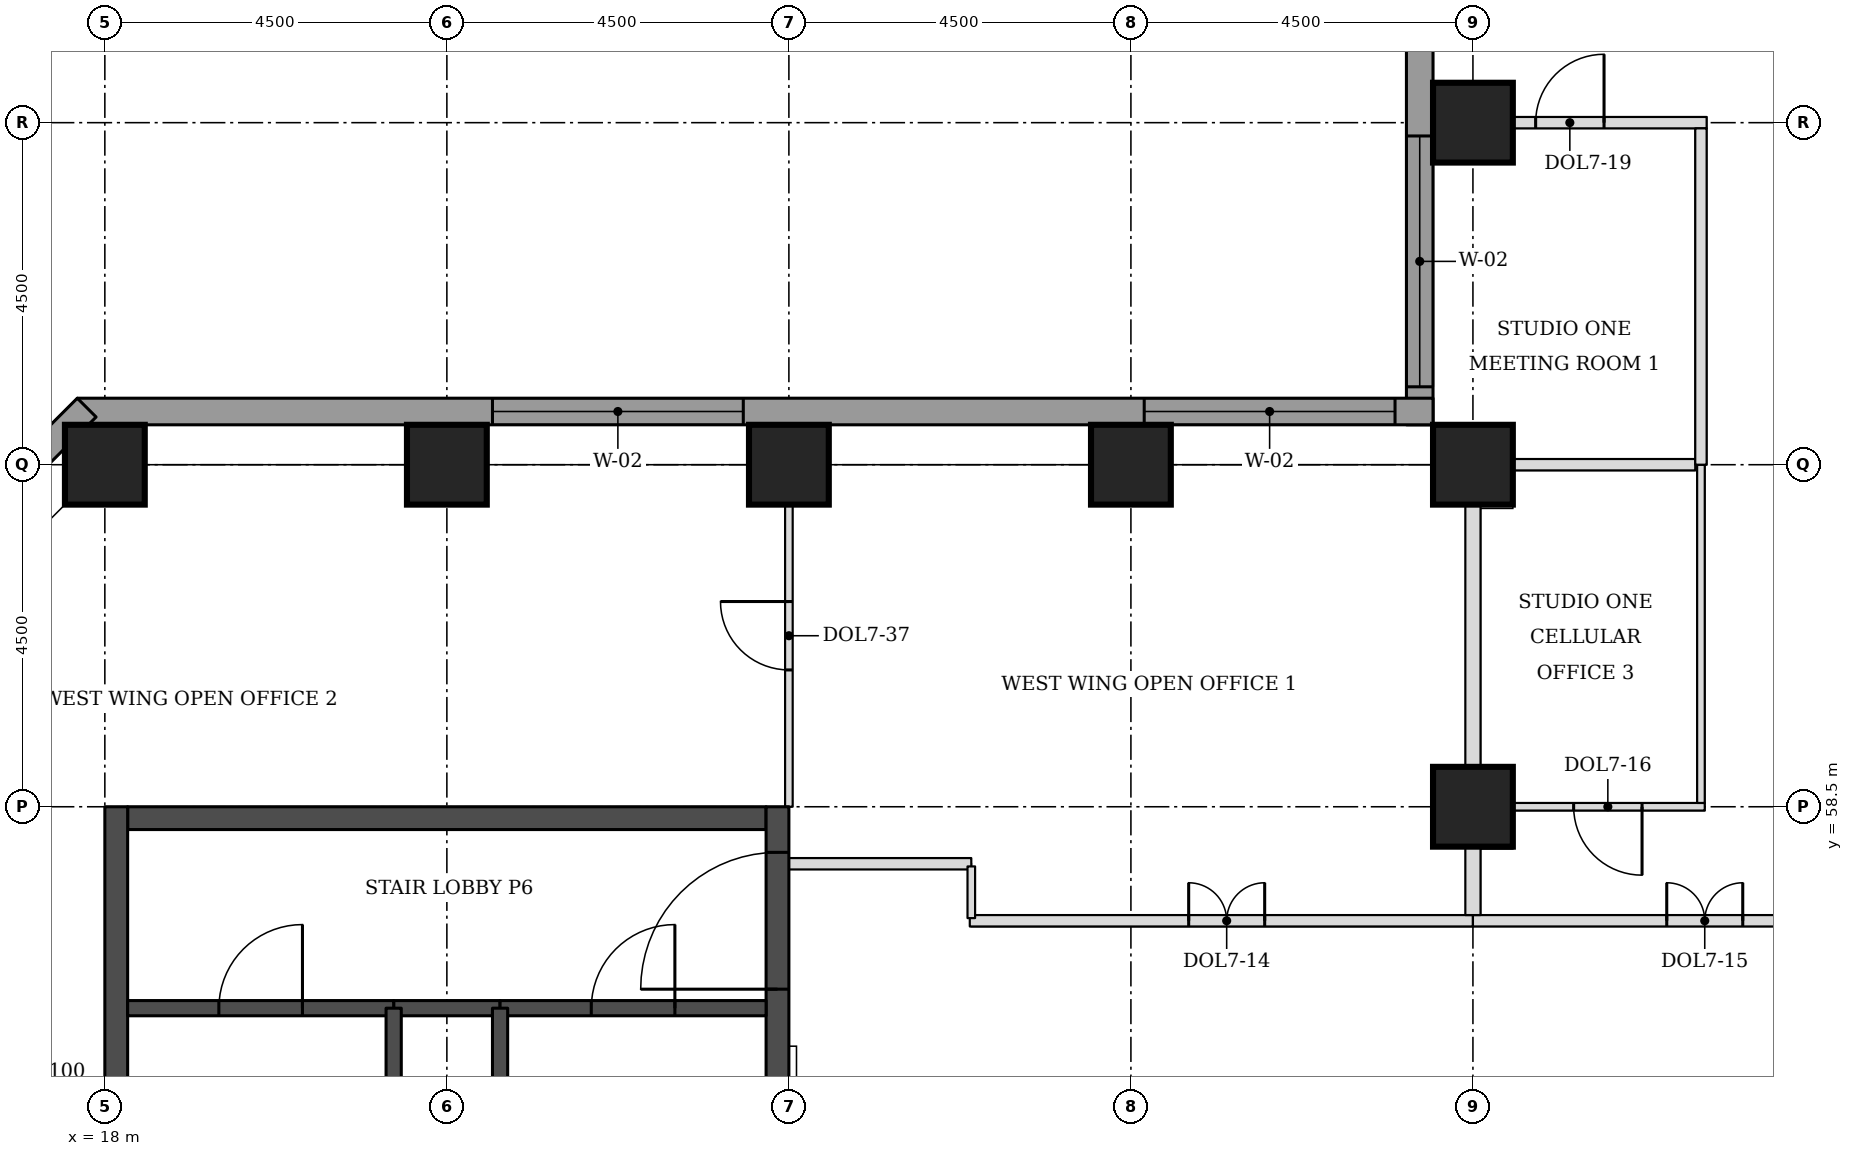
"""IFC4 building model, lengths in metres.
Left out: names, types, materials, properties, quantities, classifications, styles, units other than length and angle.
Written with IfcOpenShell. Run it as: python <this file> out.ifc"""

import sys

from ifc_helpers import new_model, si_unit, direction, frame, frame_2d, origin, origin_2d, place, context, subcontext, project, spatial, rectangle, extrude, element, fill, save


model = new_model("IFC4")
c1 = context("Model", 3, precision=1e-05, world=origin(), true_north=direction((0.0, 1.0)))
c2 = subcontext(c1, "Body", "Model", "MODEL_VIEW")
j1 = project(units=[si_unit("LENGTHUNIT", "METRE"), si_unit("PLANEANGLEUNIT", "RADIAN")], contexts=[c1])
p1 = place(None, origin())
s1 = spatial("IfcSite", under=j1, at=p1, CompositionType="ELEMENT")
p2 = place(p1, origin())
s2 = spatial("IfcBuilding", under=s1, at=p2, CompositionType="ELEMENT")
p3 = place(p2, frame((0.0, 0.0, 134.4)))
s3 = spatial("IfcBuildingStorey", under=s2, at=p3, CompositionType="ELEMENT", Elevation=134.4)
for number, where, z_axis, x_axis in (
    (1, (36.0, 58.5, 0.0), (0.0, 0.0, 1.0), (1.0, 0.0, 0.0)),
    (2, (18.0, 63.0, 0.0), (0.0, 0.0, 1.0), (1.0, 0.0, 0.0)),
    (3, (22.5, 63.0, 0.0), (0.0, 0.0, 1.0), (1.0, 0.0, 0.0)),
    (4, (27.0, 63.0, 0.0), (0.0, 0.0, 1.0), (1.0, 0.0, 0.0)),
    (5, (31.5, 63.0, 0.0), (0.0, 0.0, 1.0), (1.0, 0.0, 0.0)),
    (6, (36.0, 63.0, 0.0), (0.0, 0.0, 1.0), (1.0, 0.0, 0.0)),
    (7, (36.0, 67.5, 0.0), (0.0, 0.0, 1.0), (1.0, 0.0, 0.0)),
):
    element("IfcColumn", number, at=place(p3, frame(where, z_axis=z_axis, x_axis=x_axis)), inside=s3, PredefinedType="COLUMN", context=c2, shape_type="SweptSolid", body=[
        extrude(rectangle(XDim=1.05, YDim=1.05, at=origin_2d()), origin(), (0.0, 0.0, 1.0), 3.7),
    ])
p4 = place(p3, frame((18.3, 58.35, 0.0), z_axis=(0.0, 0.0, 1.0), x_axis=(1.0, 0.0, 0.0)))
e8 = element("IfcWall", 8, at=p4, inside=s3, PredefinedType="SHEAR", context=c2, shape_type="SweptSolid", body=[
    extrude(rectangle(XDim=8.4, YDim=0.3, at=frame_2d((4.2, 0.0))), origin(), (0.0, 0.0, 1.0), 3.7),
])
p5 = place(p3, frame((18.15, 49.5, 0.0), z_axis=(0.0, 0.0, 1.0), x_axis=(0.0, 1.0, 0.0)))
e9 = element("IfcWall", 9, at=p5, inside=s3, PredefinedType="SHEAR", context=c2, shape_type="SweptSolid", body=[
    extrude(rectangle(XDim=9.0, YDim=0.3, at=frame_2d((4.5, 0.0))), origin(), (0.0, 0.0, 1.0), 3.7),
])
p6 = place(p3, frame((26.85, 49.5, 0.0), z_axis=(0.0, 0.0, 1.0), x_axis=(0.0, 1.0, 0.0)))
e10 = element("IfcWall", 10, at=p6, inside=s3, PredefinedType="SHEAR", context=c2, shape_type="SweptSolid", body=[
    extrude(rectangle(XDim=9.0, YDim=0.3, at=frame_2d((4.5, 0.0))), origin(), (0.0, 0.0, 1.0), 3.7),
])
p7 = place(p6, frame((6.6, 0.0, 0.0)))
e11 = element("IfcOpeningElement", 11, at=p7, cuts=e10, PredefinedType="OPENING", context=c2, shape_type="SweptSolid", body=[
    extrude(rectangle(XDim=1.8, YDim=2.1, at=frame_2d((0.9, 1.05))), frame((0.0, 0.16, 0.0), z_axis=(0.0, -1.0, 0.0), x_axis=(1.0, 0.0, 0.0)), (0.0, 0.0, 1.0), 0.32),
])
p8 = place(p3, frame((35.3, 76.862, 0.0), z_axis=(0.0, 0.0, 1.0), x_axis=(0.0, -1.0, 0.0)))
e12 = element("IfcWall", 12, at=p8, inside=s3, PredefinedType="STANDARD", context=c2, shape_type="SweptSolid", body=[
    extrude(rectangle(XDim=13.337, YDim=0.35, at=frame_2d((6.669, 0.0))), origin(), (0.0, 0.0, 1.0), 3.525),
])
p9 = place(p8, frame((9.537, 0.0, 0.9)))
e13 = element("IfcOpeningElement", 13, at=p9, cuts=e12, PredefinedType="OPENING", context=c2, shape_type="SweptSolid", body=[
    extrude(rectangle(XDim=3.3, YDim=1.9, at=frame_2d((1.65, 0.95))), frame((0.0, 0.185, 0.0), z_axis=(0.0, -1.0, 0.0), x_axis=(1.0, 0.0, 0.0)), (0.0, 0.0, 1.0), 0.37),
])
p10 = place(p3, frame((35.475, 63.7, 0.0), z_axis=(0.0, 0.0, 1.0), x_axis=(-1.0, 0.0, 0.0)))
e14 = element("IfcWall", 14, at=p10, inside=s3, PredefinedType="STANDARD", context=c2, shape_type="SweptSolid", body=[
    extrude(rectangle(XDim=17.837, YDim=0.35, at=frame_2d((8.919, 0.0))), origin(), (0.0, 0.0, 1.0), 3.525),
])
p11 = place(p10, frame((0.5, 0.0, 0.9)))
e15 = element("IfcOpeningElement", 15, at=p11, cuts=e14, PredefinedType="OPENING", context=c2, shape_type="SweptSolid", body=[
    extrude(rectangle(XDim=3.3, YDim=1.9, at=frame_2d((1.65, 0.95))), frame((0.0, 0.185, 0.0), z_axis=(0.0, -1.0, 0.0), x_axis=(1.0, 0.0, 0.0)), (0.0, 0.0, 1.0), 0.37),
])
p12 = place(p10, frame((9.075, 0.0, 0.9)))
e16 = element("IfcOpeningElement", 16, at=p12, cuts=e14, PredefinedType="OPENING", context=c2, shape_type="SweptSolid", body=[
    extrude(rectangle(XDim=3.3, YDim=1.9, at=frame_2d((1.65, 0.95))), frame((0.0, 0.185, 0.0), z_axis=(0.0, -1.0, 0.0), x_axis=(1.0, 0.0, 0.0)), (0.0, 0.0, 1.0), 0.37),
])
p13 = place(p3, frame((17.761, 63.751, 0.0), z_axis=(0.0, 0.0, 1.0), x_axis=(-0.707106781187, -0.707106781187, 0.0)))
e17 = element("IfcWall", 17, at=p13, inside=s3, PredefinedType="STANDARD", context=c2, shape_type="SweptSolid", body=[
    extrude(rectangle(XDim=7.089, YDim=0.35, at=frame_2d((3.544, 0.0))), origin(), (0.0, 0.0, 1.0), 3.525),
])
p14 = place(p13, frame((1.894, 0.0, 0.9)))
e18 = element("IfcOpeningElement", 18, at=p14, cuts=e17, PredefinedType="OPENING", context=c2, shape_type="SweptSolid", body=[
    extrude(rectangle(XDim=3.3, YDim=1.9, at=frame_2d((1.65, 0.95))), frame((0.0, 0.185, 0.0), z_axis=(0.0, -1.0, 0.0), x_axis=(1.0, 0.0, 0.0)), (0.0, 0.0, 1.0), 0.37),
])
p15 = place(p3, frame((29.38, 57.0, 0.0), z_axis=(0.0, 0.0, 1.0), x_axis=(1.0, 0.0, 0.0)))
e19 = element("IfcWall", 19, at=p15, inside=s3, PredefinedType="PARTITIONING", context=c2, shape_type="SweptSolid", body=[
    extrude(rectangle(XDim=6.62, YDim=0.15, at=frame_2d((3.31, 0.0))), origin(), (0.0, 0.0, 1.0), 3.55),
])
p16 = place(p15, frame((2.88, 0.0, 0.0)))
e20 = element("IfcOpeningElement", 20, at=p16, cuts=e19, PredefinedType="OPENING", context=c2, shape_type="SweptSolid", body=[
    extrude(rectangle(XDim=1.0, YDim=2.1, at=frame_2d((0.5, 1.05))), frame((0.0, 0.085, 0.0), z_axis=(0.0, -1.0, 0.0), x_axis=(1.0, 0.0, 0.0)), (0.0, 0.0, 1.0), 0.17),
])
p17 = place(p3, frame((36.0, 57.0, 0.0), z_axis=(0.0, 0.0, 1.0), x_axis=(1.0, 0.0, 0.0)))
e21 = element("IfcWall", 21, at=p17, inside=s3, PredefinedType="PARTITIONING", context=c2, shape_type="SweptSolid", body=[
    extrude(rectangle(XDim=6.075, YDim=0.15, at=frame_2d((3.038, 0.0))), origin(), (0.0, 0.0, 1.0), 3.55),
])
p18 = place(p17, frame((2.55, 0.0, 0.0)))
e22 = element("IfcOpeningElement", 22, at=p18, cuts=e21, PredefinedType="OPENING", context=c2, shape_type="SweptSolid", body=[
    extrude(rectangle(XDim=1.0, YDim=2.1, at=frame_2d((0.5, 1.05))), frame((0.0, 0.085, 0.0), z_axis=(0.0, -1.0, 0.0), x_axis=(1.0, 0.0, 0.0)), (0.0, 0.0, 1.0), 0.17),
])
p19 = place(p3, frame((36.525, 58.5, 0.0), z_axis=(0.0, 0.0, 1.0), x_axis=(1.0, 0.0, 0.0)))
e23 = element("IfcWall", 23, at=p19, inside=s3, PredefinedType="PARTITIONING", context=c2, shape_type="SweptSolid", body=[
    extrude(rectangle(XDim=2.525, YDim=0.1, at=frame_2d((1.263, 0.0))), origin(), (0.0, 0.0, 1.0), 3.55),
])
p20 = place(p19, frame((0.8, 0.0, 0.0)))
e24 = element("IfcOpeningElement", 24, at=p20, cuts=e23, PredefinedType="OPENING", context=c2, shape_type="SweptSolid", body=[
    extrude(rectangle(XDim=0.9, YDim=2.1, at=frame_2d((0.45, 1.05))), frame((0.0, 0.06, 0.0), z_axis=(0.0, -1.0, 0.0), x_axis=(1.0, 0.0, 0.0)), (0.0, 0.0, 1.0), 0.12),
])
p21 = place(p3, frame((36.525, 63.0, 0.0), z_axis=(0.0, 0.0, 1.0), x_axis=(1.0, 0.0, 0.0)))
e25 = element("IfcWall", 25, at=p21, inside=s3, PredefinedType="PARTITIONING", context=c2, shape_type="SweptSolid", body=[
    extrude(rectangle(XDim=2.4, YDim=0.15, at=frame_2d((1.2, 0.0))), origin(), (0.0, 0.0, 1.0), 3.55),
])
p22 = place(p3, frame((35.475, 67.5, 0.0), z_axis=(0.0, 0.0, 1.0), x_axis=(1.0, 0.0, 0.0)))
e26 = element("IfcWall", 26, at=p22, inside=s3, PredefinedType="PARTITIONING", context=c2, shape_type="SweptSolid", body=[
    extrude(rectangle(XDim=3.6, YDim=0.15, at=frame_2d((1.8, 0.0))), origin(), (0.0, 0.0, 1.0), 3.55),
])
p23 = place(p22, frame((1.35, 0.0, 0.0)))
e27 = element("IfcOpeningElement", 27, at=p23, cuts=e26, PredefinedType="OPENING", context=c2, shape_type="SweptSolid", body=[
    extrude(rectangle(XDim=0.9, YDim=2.1, at=frame_2d((0.45, 1.05))), frame((0.0, 0.085, 0.0), z_axis=(0.0, -1.0, 0.0), x_axis=(1.0, 0.0, 0.0)), (0.0, 0.0, 1.0), 0.17),
])
p24 = place(p3, frame((36.0, 57.075, 0.0), z_axis=(0.0, 0.0, 1.0), x_axis=(0.0, 1.0, 0.0)))
e28 = element("IfcWall", 28, at=p24, inside=s3, PredefinedType="PARTITIONING", context=c2, shape_type="SweptSolid", body=[
    extrude(rectangle(XDim=0.9, YDim=0.2, at=frame_2d((0.45, 0.0))), origin(), (0.0, 0.0, 1.0), 2.8),
])
p25 = place(p3, frame((39.0, 58.55, 0.0), z_axis=(0.0, 0.0, 1.0), x_axis=(0.0, 1.0, 0.0)))
e29 = element("IfcWall", 29, at=p25, inside=s3, PredefinedType="PARTITIONING", context=c2, shape_type="SweptSolid", body=[
    extrude(rectangle(XDim=4.45, YDim=0.1, at=frame_2d((2.225, 0.0))), origin(), (0.0, 0.0, 1.0), 3.55),
])
p26 = place(p3, frame((36.0, 58.995, 0.0), z_axis=(0.0, 0.0, 1.0), x_axis=(0.0, 1.0, 0.0)))
e30 = element("IfcWall", 30, at=p26, inside=s3, PredefinedType="PARTITIONING", context=c2, shape_type="SweptSolid", body=[
    extrude(rectangle(XDim=3.48, YDim=0.2, at=frame_2d((1.74, 0.0))), origin(), (0.0, 0.0, 1.0), 2.8),
])
p27 = place(p3, frame((39.0, 63.0, 0.0), z_axis=(0.0, 0.0, 1.0), x_axis=(0.0, 1.0, 0.0)))
e31 = element("IfcWall", 31, at=p27, inside=s3, PredefinedType="PARTITIONING", context=c2, shape_type="SweptSolid", body=[
    extrude(rectangle(XDim=4.425, YDim=0.15, at=frame_2d((2.212, 0.0))), origin(), (0.0, 0.0, 1.0), 3.55),
])
p28 = place(p3, frame((27.0, 63.0, 0.0), z_axis=(0.0, 0.0, 1.0), x_axis=(0.0, -1.0, 0.0)))
e32 = element("IfcWall", 32, at=p28, inside=s3, PredefinedType="PARTITIONING", context=c2, shape_type="SweptSolid", body=[
    extrude(rectangle(XDim=4.5, YDim=0.1, at=frame_2d((2.25, 0.0))), origin(), (0.0, 0.0, 1.0), 3.55),
])
p29 = place(p28, frame((1.8, 0.0, 0.0)))
e33 = element("IfcOpeningElement", 33, at=p29, cuts=e32, PredefinedType="OPENING", context=c2, shape_type="SweptSolid", body=[
    extrude(rectangle(XDim=0.9, YDim=2.1, at=frame_2d((0.45, 1.05))), frame((0.0, 0.06, 0.0), z_axis=(0.0, -1.0, 0.0), x_axis=(1.0, 0.0, 0.0)), (0.0, 0.0, 1.0), 0.12),
])
p30 = place(p3, frame((27.0, 57.75, 0.0), z_axis=(0.0, 0.0, 1.0), x_axis=(1.0, 0.0, 0.0)))
e34 = element("IfcWall", 34, at=p30, inside=s3, PredefinedType="PARTITIONING", context=c2, shape_type="SweptSolid", body=[
    extrude(rectangle(XDim=2.4, YDim=0.15, at=frame_2d((1.2, 0.0))), origin(), (0.0, 0.0, 1.0), 3.55),
])
p31 = place(p3, frame((29.4, 57.715, 0.0), z_axis=(0.0, 0.0, 1.0), x_axis=(0.0, -1.0, 0.0)))
e35 = element("IfcWall", 35, at=p31, inside=s3, PredefinedType="PARTITIONING", context=c2, shape_type="SweptSolid", body=[
    extrude(rectangle(XDim=0.68, YDim=0.1, at=frame_2d((0.34, 0.0))), origin(), (0.0, 0.0, 1.0), 3.55),
])
p32 = place(p3, frame((21.8, 55.85, 0.0), z_axis=(0.0, 0.0, 1.0), x_axis=(1.0, 0.0, 0.0)))
e36 = element("IfcWall", 36, at=p32, inside=s3, PredefinedType="SOLIDWALL", context=c2, shape_type="SweptSolid", body=[
    extrude(rectangle(XDim=1.4, YDim=0.2, at=frame_2d((0.7, 0.0))), origin(), (0.0, 0.0, 1.0), 3.55),
])
p33 = place(p3, frame((18.3, 55.85, 0.0), z_axis=(0.0, 0.0, 1.0), x_axis=(1.0, 0.0, 0.0)))
e37 = element("IfcWall", 37, at=p33, inside=s3, PredefinedType="SOLIDWALL", context=c2, shape_type="SweptSolid", body=[
    extrude(rectangle(XDim=3.5, YDim=0.2, at=frame_2d((1.75, 0.0))), origin(), (0.0, 0.0, 1.0), 3.55),
])
p34 = place(p33, frame((1.2, 0.0, 0.0)))
e38 = element("IfcOpeningElement", 38, at=p34, cuts=e37, PredefinedType="OPENING", context=c2, shape_type="SweptSolid", body=[
    extrude(rectangle(XDim=1.1, YDim=2.1, at=frame_2d((0.55, 1.05))), frame((0.0, 0.11, 0.0), z_axis=(0.0, -1.0, 0.0), x_axis=(1.0, 0.0, 0.0)), (0.0, 0.0, 1.0), 0.22),
])
p35 = place(p3, frame((23.2, 55.85, 0.0), z_axis=(0.0, 0.0, 1.0), x_axis=(1.0, 0.0, 0.0)))
e39 = element("IfcWall", 39, at=p35, inside=s3, PredefinedType="SOLIDWALL", context=c2, shape_type="SweptSolid", body=[
    extrude(rectangle(XDim=3.5, YDim=0.2, at=frame_2d((1.75, 0.0))), origin(), (0.0, 0.0, 1.0), 3.55),
])
p36 = place(p35, frame((1.2, 0.0, 0.0)))
e40 = element("IfcOpeningElement", 40, at=p36, cuts=e39, PredefinedType="OPENING", context=c2, shape_type="SweptSolid", body=[
    extrude(rectangle(XDim=1.1, YDim=2.1, at=frame_2d((0.55, 1.05))), frame((0.0, 0.11, 0.0), z_axis=(0.0, -1.0, 0.0), x_axis=(1.0, 0.0, 0.0)), (0.0, 0.0, 1.0), 0.22),
])
for number, where, z_axis, x_axis in (
    (41, (21.8, 49.8, 0.0), (0.0, 0.0, 1.0), (0.0, 1.0, 0.0)),
    (42, (23.2, 49.8, 0.0), (0.0, 0.0, 1.0), (0.0, 1.0, 0.0)),
):
    element("IfcWall", number, at=place(p3, frame(where, z_axis=z_axis, x_axis=x_axis)), inside=s3, PredefinedType="SOLIDWALL", context=c2, shape_type="SweptSolid", body=[
        extrude(rectangle(XDim=6.05, YDim=0.2, at=frame_2d((3.025, 0.0))), origin(), (0.0, 0.0, 1.0), 3.55),
    ])
p37 = place(p9, origin())
e43 = element("IfcWindow", 43, at=p37, inside=s3, PartitioningType="SINGLE_PANEL", PredefinedType="WINDOW", context=c2, shape_type="SweptSolid", body=[
    extrude(rectangle(XDim=3.3, YDim=1.9, at=frame_2d((1.65, 0.95))), frame((0.0, 0.085, 0.0), z_axis=(0.0, -1.0, 0.0), x_axis=(1.0, 0.0, 0.0)), (0.0, 0.0, 1.0), 0.06),
])
fill(e13, e43)
p38 = place(p11, origin())
e44 = element("IfcWindow", 44, at=p38, inside=s3, PartitioningType="SINGLE_PANEL", PredefinedType="WINDOW", context=c2, shape_type="SweptSolid", body=[
    extrude(rectangle(XDim=3.3, YDim=1.9, at=frame_2d((1.65, 0.95))), frame((0.0, 0.085, 0.0), z_axis=(0.0, -1.0, 0.0), x_axis=(1.0, 0.0, 0.0)), (0.0, 0.0, 1.0), 0.06),
])
fill(e15, e44)
p39 = place(p12, origin())
e45 = element("IfcWindow", 45, at=p39, inside=s3, PartitioningType="SINGLE_PANEL", PredefinedType="WINDOW", context=c2, shape_type="SweptSolid", body=[
    extrude(rectangle(XDim=3.3, YDim=1.9, at=frame_2d((1.65, 0.95))), frame((0.0, 0.085, 0.0), z_axis=(0.0, -1.0, 0.0), x_axis=(1.0, 0.0, 0.0)), (0.0, 0.0, 1.0), 0.06),
])
fill(e16, e45)
p40 = place(p18, origin())
e46 = element("IfcDoor", 46, at=p40, inside=s3, OperationType="DOUBLE_DOOR_SINGLE_SWING", PredefinedType="DOOR", context=c2, shape_type="SweptSolid", body=[
    extrude(rectangle(XDim=1.0, YDim=2.1, at=frame_2d((0.5, 1.05))), frame((0.0, 0.025, 0.0), z_axis=(0.0, -1.0, 0.0), x_axis=(1.0, 0.0, 0.0)), (0.0, 0.0, 1.0), 0.05),
])
fill(e22, e46)
p41 = place(p20, frame((0.9, 0.0, 0.0), z_axis=(0.0, 0.0, 1.0), x_axis=(-1.0, 0.0, 0.0)))
e47 = element("IfcDoor", 47, at=p41, inside=s3, OperationType="SINGLE_SWING_LEFT", PredefinedType="DOOR", context=c2, shape_type="SweptSolid", body=[
    extrude(rectangle(XDim=0.9, YDim=2.1, at=frame_2d((0.45, 1.05))), frame((0.0, 0.025, 0.0), z_axis=(0.0, -1.0, 0.0), x_axis=(1.0, 0.0, 0.0)), (0.0, 0.0, 1.0), 0.05),
])
fill(e24, e47)
p42 = place(p23, origin())
e48 = element("IfcDoor", 48, at=p42, inside=s3, OperationType="SINGLE_SWING_RIGHT", PredefinedType="DOOR", context=c2, shape_type="SweptSolid", body=[
    extrude(rectangle(XDim=0.9, YDim=2.1, at=frame_2d((0.45, 1.05))), frame((0.0, 0.025, 0.0), z_axis=(0.0, -1.0, 0.0), x_axis=(1.0, 0.0, 0.0)), (0.0, 0.0, 1.0), 0.05),
])
fill(e27, e48)
p43 = place(p16, origin())
e49 = element("IfcDoor", 49, at=p43, inside=s3, OperationType="DOUBLE_DOOR_SINGLE_SWING", PredefinedType="DOOR", context=c2, shape_type="SweptSolid", body=[
    extrude(rectangle(XDim=1.0, YDim=2.1, at=frame_2d((0.5, 1.05))), frame((0.0, 0.025, 0.0), z_axis=(0.0, -1.0, 0.0), x_axis=(1.0, 0.0, 0.0)), (0.0, 0.0, 1.0), 0.05),
])
fill(e20, e49)
p44 = place(p29, frame((0.9, 0.0, 0.0), z_axis=(0.0, 0.0, 1.0), x_axis=(-1.0, 0.0, 0.0)))
e50 = element("IfcDoor", 50, at=p44, inside=s3, OperationType="SINGLE_SWING_RIGHT", PredefinedType="DOOR", context=c2, shape_type="SweptSolid", body=[
    extrude(rectangle(XDim=0.9, YDim=2.1, at=frame_2d((0.45, 1.05))), frame((0.0, 0.025, 0.0), z_axis=(0.0, -1.0, 0.0), x_axis=(1.0, 0.0, 0.0)), (0.0, 0.0, 1.0), 0.05),
])
fill(e33, e50)
p45 = place(p34, origin())
e51 = element("IfcDoor", 51, at=p45, inside=s3, OperationType="SINGLE_SWING_RIGHT", PredefinedType="DOOR", context=c2, shape_type="SweptSolid", body=[
    extrude(rectangle(XDim=1.1, YDim=2.1, at=frame_2d((0.55, 1.05))), frame((0.0, 0.025, 0.0), z_axis=(0.0, -1.0, 0.0), x_axis=(1.0, 0.0, 0.0)), (0.0, 0.0, 1.0), 0.05),
])
fill(e38, e51)
p46 = place(p36, origin())
e52 = element("IfcDoor", 52, at=p46, inside=s3, OperationType="SINGLE_SWING_RIGHT", PredefinedType="DOOR", context=c2, shape_type="SweptSolid", body=[
    extrude(rectangle(XDim=1.1, YDim=2.1, at=frame_2d((0.55, 1.05))), frame((0.0, 0.025, 0.0), z_axis=(0.0, -1.0, 0.0), x_axis=(1.0, 0.0, 0.0)), (0.0, 0.0, 1.0), 0.05),
])
fill(e40, e52)
p47 = place(p7, origin())
e53 = element("IfcDoor", 53, at=p47, inside=s3, OperationType="SINGLE_SWING_LEFT", PredefinedType="DOOR", context=c2, shape_type="SweptSolid", body=[
    extrude(rectangle(XDim=1.8, YDim=2.1, at=frame_2d((0.9, 1.05))), frame((0.0, 0.025, 0.0), z_axis=(0.0, -1.0, 0.0), x_axis=(1.0, 0.0, 0.0)), (0.0, 0.0, 1.0), 0.05),
])
fill(e11, e53)
save(model, sys.argv[1])
